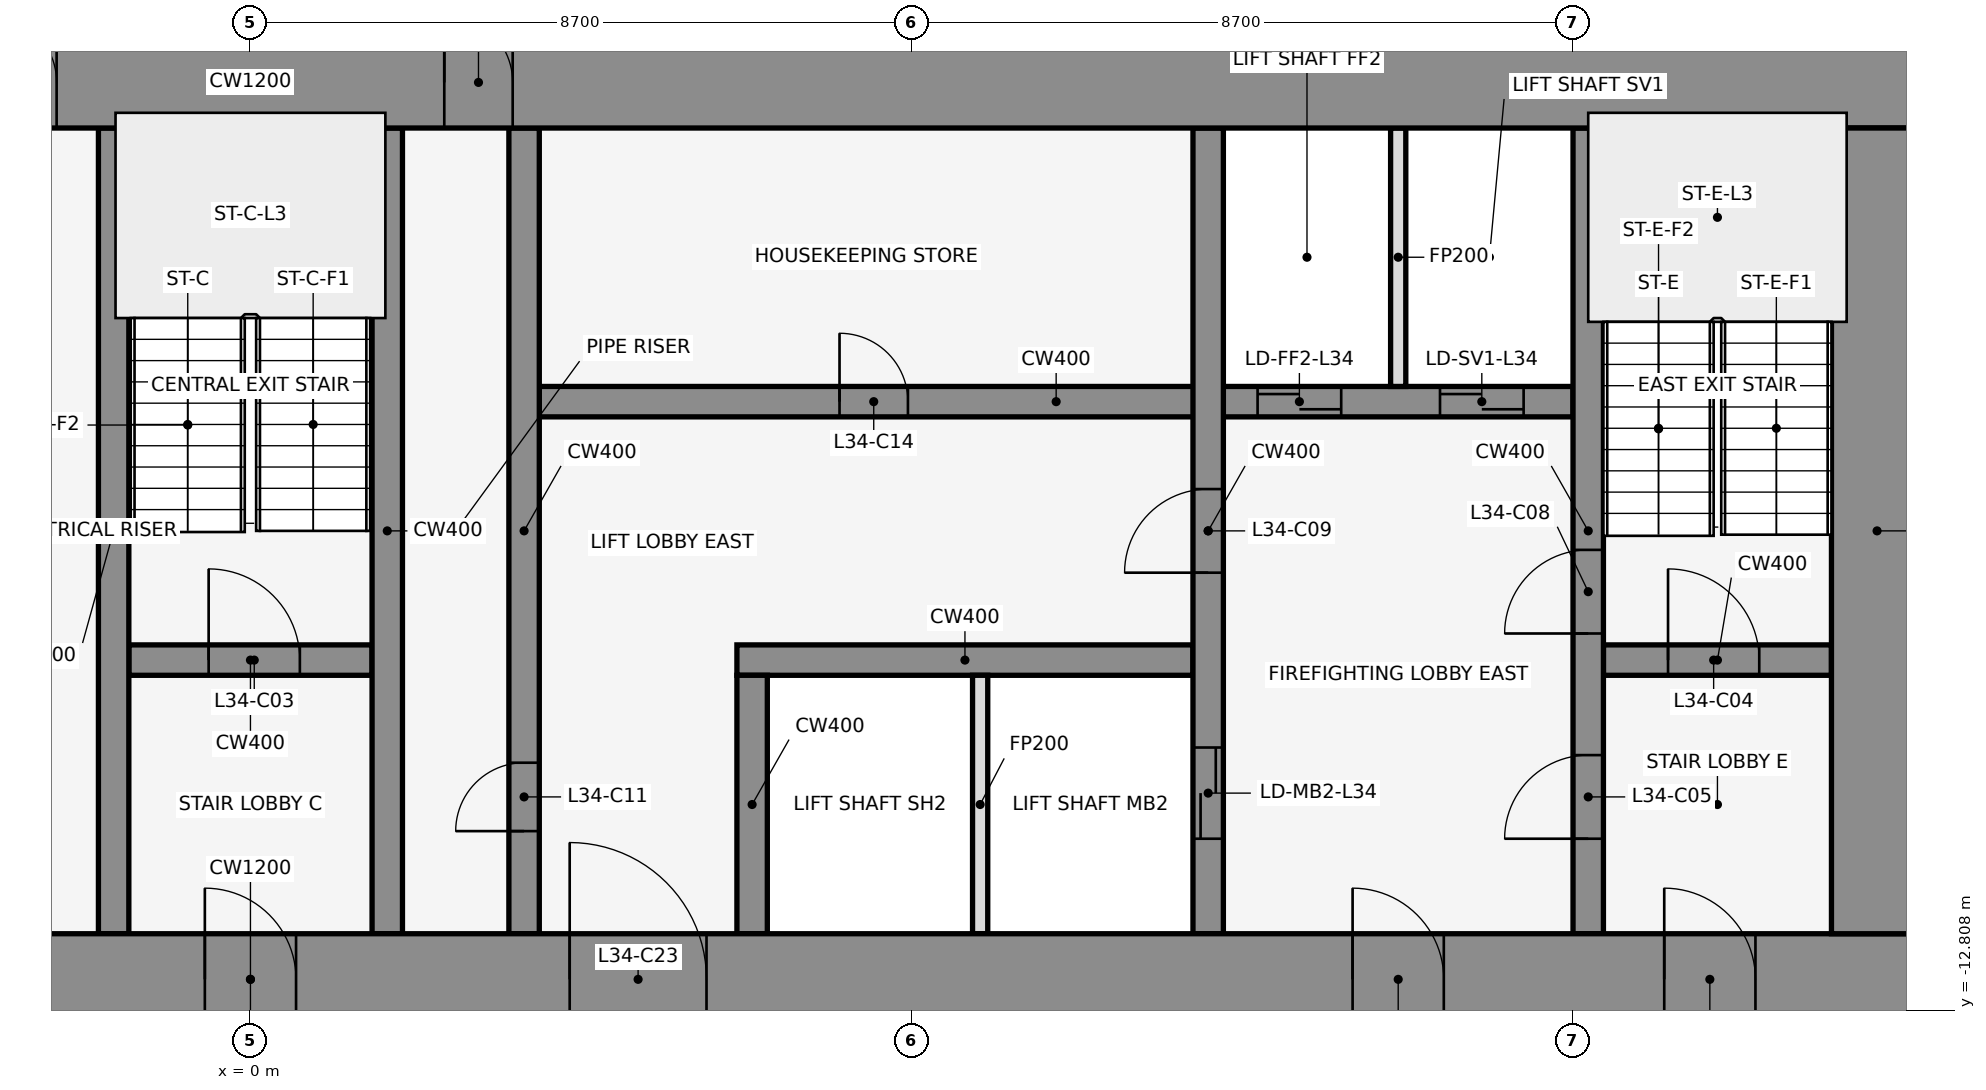
"""IFC4 building model, lengths in metres.
Left out: names, types, materials, properties, quantities, classifications, styles, units other than length and angle.
Written with IfcOpenShell. Run it as: python <this file> out.ifc"""

import sys

from ifc_helpers import new_model, si_unit, direction, frame, frame_2d, origin, place, context, subcontext, project, spatial, rectangle, extrude, element, fill, save


model = new_model("IFC4")
c1 = context("Model", 3, precision=1e-05, world=origin(), true_north=direction((0.0, 1.0)))
c2 = subcontext(c1, "Body", "Model", "MODEL_VIEW")
j1 = project(units=[si_unit("LENGTHUNIT", "METRE"), si_unit("PLANEANGLEUNIT", "RADIAN")], contexts=[c1])
p1 = place(None, origin())
s1 = spatial("IfcSite", under=j1, at=p1, CompositionType="ELEMENT")
p2 = place(p1, origin())
s2 = spatial("IfcBuilding", under=s1, at=p2, CompositionType="ELEMENT")
p3 = place(p2, frame((0.0, 0.0, 156.8)))
s3 = spatial("IfcBuildingStorey", under=s2, at=p3, CompositionType="ELEMENT", Elevation=156.8)
for number, where, z_axis, x_axis in (
    (1, (16.432, -0.105, 0.0), (0.0, 0.0, 1.0), (-0.84, 0.543, 0.0)),
    (2, (1.901, 1.08, 0.0), (0.0, 0.0, 1.0), (-0.84, -0.543, 0.0)),
    (3, (-0.068, -0.105, 0.0), (0.0, 0.0, 1.0), (-0.84, 0.543, 0.0)),
):
    element("IfcWall", number, at=place(p3, frame(where, z_axis=z_axis, x_axis=x_axis)), inside=s3, PredefinedType="STANDARD", context=c2, shape_type="SweptSolid", body=[
        extrude(rectangle(XDim=2.183, YDim=0.25, at=frame_2d((1.091, 0.0))), origin(), (0.0, 0.0, 1.0), 3.95),
    ])
p4 = place(p3, frame((-1.6, -8.2, 0.0), z_axis=(0.0, 0.0, 1.0), x_axis=(1.0, 0.0, 0.0)))
e4 = element("IfcWall", 4, at=p4, inside=s3, PredefinedType="SHEAR", context=c2, shape_type="SweptSolid", body=[
    extrude(rectangle(XDim=3.2, YDim=0.4, at=frame_2d((1.6, 0.0))), origin(), (0.0, 0.0, 1.0), 4.1),
])
p5 = place(p4, frame((1.05, 0.0, 0.0)))
e5 = element("IfcOpeningElement", 5, at=p5, cuts=e4, PredefinedType="OPENING", context=c2, shape_type="SweptSolid", body=[
    extrude(rectangle(XDim=1.2, YDim=2.1, at=frame_2d((0.6, 1.05))), frame((0.0, 0.212, 0.0), z_axis=(0.0, -1.0, 0.0), x_axis=(1.0, 0.0, 0.0)), (0.0, 0.0, 1.0), 0.424),
])
p6 = place(p3, frame((6.4, -8.2, 0.0), z_axis=(0.0, 0.0, 1.0), x_axis=(1.0, 0.0, 0.0)))
e6 = element("IfcWall", 6, at=p6, inside=s3, PredefinedType="SHEAR", context=c2, shape_type="SweptSolid", body=[
    extrude(rectangle(XDim=6.0, YDim=0.4, at=frame_2d((3.0, 0.0))), origin(), (0.0, 0.0, 1.0), 4.1),
])
p7 = place(p3, frame((17.8, -8.2, 0.0), z_axis=(0.0, 0.0, 1.0), x_axis=(1.0, 0.0, 0.0)))
e7 = element("IfcWall", 7, at=p7, inside=s3, PredefinedType="SHEAR", context=c2, shape_type="SweptSolid", body=[
    extrude(rectangle(XDim=3.0, YDim=0.4, at=frame_2d((1.5, 0.0))), origin(), (0.0, 0.0, 1.0), 4.1),
])
p8 = place(p7, frame((0.85, 0.0, 0.0)))
e8 = element("IfcOpeningElement", 8, at=p8, cuts=e7, PredefinedType="OPENING", context=c2, shape_type="SweptSolid", body=[
    extrude(rectangle(XDim=1.2, YDim=2.1, at=frame_2d((0.6, 1.05))), frame((0.0, 0.212, 0.0), z_axis=(0.0, -1.0, 0.0), x_axis=(1.0, 0.0, 0.0)), (0.0, 0.0, 1.0), 0.424),
])
p9 = place(p3, frame((3.8, -4.8, 0.0), z_axis=(0.0, 0.0, 1.0), x_axis=(1.0, 0.0, 0.0)))
e9 = element("IfcWall", 9, at=p9, inside=s3, PredefinedType="SHEAR", context=c2, shape_type="SweptSolid", body=[
    extrude(rectangle(XDim=13.6, YDim=0.4, at=frame_2d((6.8, 0.0))), origin(), (0.0, 0.0, 1.0), 4.1),
])
p10 = place(p9, frame((9.45, 0.0, 0.0)))
e10 = element("IfcOpeningElement", 10, at=p10, cuts=e9, PredefinedType="OPENING", context=c2, shape_type="SweptSolid", body=[
    extrude(rectangle(XDim=1.1, YDim=2.1, at=frame_2d((0.55, 1.05))), frame((0.0, 0.212, 0.0), z_axis=(0.0, -1.0, 0.0), x_axis=(1.0, 0.0, 0.0)), (0.0, 0.0, 1.0), 0.424),
])
p11 = place(p9, frame((11.85, 0.0, 0.0)))
e11 = element("IfcOpeningElement", 11, at=p11, cuts=e9, PredefinedType="OPENING", context=c2, shape_type="SweptSolid", body=[
    extrude(rectangle(XDim=1.1, YDim=2.1, at=frame_2d((0.55, 1.05))), frame((0.0, 0.212, 0.0), z_axis=(0.0, -1.0, 0.0), x_axis=(1.0, 0.0, 0.0)), (0.0, 0.0, 1.0), 0.424),
])
p12 = place(p9, frame((3.95, 0.0, 0.0)))
e12 = element("IfcOpeningElement", 12, at=p12, cuts=e9, PredefinedType="OPENING", context=c2, shape_type="SweptSolid", body=[
    extrude(rectangle(XDim=0.9, YDim=2.1, at=frame_2d((0.45, 1.05))), frame((0.0, 0.212, 0.0), z_axis=(0.0, -1.0, 0.0), x_axis=(1.0, 0.0, 0.0)), (0.0, 0.0, 1.0), 0.424),
])
for number, where, z_axis, x_axis in (
    (13, (-1.8, -11.8, 0.0), (0.0, 0.0, 1.0), (0.0, 1.0, 0.0)),
    (14, (1.8, -11.8, 0.0), (0.0, 0.0, 1.0), (0.0, 1.0, 0.0)),
):
    element("IfcWall", number, at=place(p3, frame(where, z_axis=z_axis, x_axis=x_axis)), inside=s3, PredefinedType="SHEAR", context=c2, shape_type="SweptSolid", body=[
        extrude(rectangle(XDim=10.6, YDim=0.4, at=frame_2d((5.3, 0.0))), origin(), (0.0, 0.0, 1.0), 4.1),
    ])
p13 = place(p3, frame((3.6, -11.8, 0.0), z_axis=(0.0, 0.0, 1.0), x_axis=(0.0, 1.0, 0.0)))
e15 = element("IfcWall", 15, at=p13, inside=s3, PredefinedType="SHEAR", context=c2, shape_type="SweptSolid", body=[
    extrude(rectangle(XDim=10.6, YDim=0.4, at=frame_2d((5.3, 0.0))), origin(), (0.0, 0.0, 1.0), 4.1),
])
p14 = place(p13, frame((1.35, 0.0, 0.0)))
e16 = element("IfcOpeningElement", 16, at=p14, cuts=e15, PredefinedType="OPENING", context=c2, shape_type="SweptSolid", body=[
    extrude(rectangle(XDim=0.9, YDim=2.1, at=frame_2d((0.45, 1.05))), frame((0.0, 0.212, 0.0), z_axis=(0.0, -1.0, 0.0), x_axis=(1.0, 0.0, 0.0)), (0.0, 0.0, 1.0), 0.424),
])
p15 = place(p3, frame((6.6, -11.8, 0.0), z_axis=(0.0, 0.0, 1.0), x_axis=(0.0, 1.0, 0.0)))
e17 = element("IfcWall", 17, at=p15, inside=s3, PredefinedType="SHEAR", context=c2, shape_type="SweptSolid", body=[
    extrude(rectangle(XDim=3.4, YDim=0.4, at=frame_2d((1.7, 0.0))), origin(), (0.0, 0.0, 1.0), 4.1),
])
p16 = place(p3, frame((9.6, -11.8, 0.0), z_axis=(0.0, 0.0, 1.0), x_axis=(0.0, 1.0, 0.0)))
e18 = element("IfcWall", 18, at=p16, inside=s3, PredefinedType="PARTITIONING", context=c2, shape_type="SweptSolid", body=[
    extrude(rectangle(XDim=3.4, YDim=0.2, at=frame_2d((1.7, 0.0))), origin(), (0.0, 0.0, 1.0), 2.84),
])
p17 = place(p3, frame((12.6, -11.8, 0.0), z_axis=(0.0, 0.0, 1.0), x_axis=(0.0, 1.0, 0.0)))
e19 = element("IfcWall", 19, at=p17, inside=s3, PredefinedType="SHEAR", context=c2, shape_type="SweptSolid", body=[
    extrude(rectangle(XDim=10.6, YDim=0.4, at=frame_2d((5.3, 0.0))), origin(), (0.0, 0.0, 1.0), 4.1),
])
p18 = place(p17, frame((1.25, 0.0, 0.0)))
e20 = element("IfcOpeningElement", 20, at=p18, cuts=e19, PredefinedType="OPENING", context=c2, shape_type="SweptSolid", body=[
    extrude(rectangle(XDim=1.2, YDim=2.1, at=frame_2d((0.6, 1.05))), frame((0.0, 0.212, 0.0), z_axis=(0.0, -1.0, 0.0), x_axis=(1.0, 0.0, 0.0)), (0.0, 0.0, 1.0), 0.424),
])
p19 = place(p17, frame((4.75, 0.0, 0.0)))
e21 = element("IfcOpeningElement", 21, at=p19, cuts=e19, PredefinedType="OPENING", context=c2, shape_type="SweptSolid", body=[
    extrude(rectangle(XDim=1.1, YDim=2.1, at=frame_2d((0.55, 1.05))), frame((0.0, 0.212, 0.0), z_axis=(0.0, -1.0, 0.0), x_axis=(1.0, 0.0, 0.0)), (0.0, 0.0, 1.0), 0.424),
])
p20 = place(p3, frame((15.1, -4.6, 0.0), z_axis=(0.0, 0.0, 1.0), x_axis=(0.0, 1.0, 0.0)))
e22 = element("IfcWall", 22, at=p20, inside=s3, PredefinedType="PARTITIONING", context=c2, shape_type="SweptSolid", body=[
    extrude(rectangle(XDim=3.4, YDim=0.2, at=frame_2d((1.7, 0.0))), origin(), (0.0, 0.0, 1.0), 2.84),
])
p21 = place(p3, frame((17.6, -11.8, 0.0), z_axis=(0.0, 0.0, 1.0), x_axis=(0.0, 1.0, 0.0)))
e23 = element("IfcWall", 23, at=p21, inside=s3, PredefinedType="SHEAR", context=c2, shape_type="SweptSolid", body=[
    extrude(rectangle(XDim=10.6, YDim=0.4, at=frame_2d((5.3, 0.0))), origin(), (0.0, 0.0, 1.0), 4.1),
])
p22 = place(p21, frame((1.25, 0.0, 0.0)))
e24 = element("IfcOpeningElement", 24, at=p22, cuts=e23, PredefinedType="OPENING", context=c2, shape_type="SweptSolid", body=[
    extrude(rectangle(XDim=1.1, YDim=2.1, at=frame_2d((0.55, 1.05))), frame((0.0, 0.212, 0.0), z_axis=(0.0, -1.0, 0.0), x_axis=(1.0, 0.0, 0.0)), (0.0, 0.0, 1.0), 0.424),
])
p23 = place(p21, frame((3.95, 0.0, 0.0)))
e25 = element("IfcOpeningElement", 25, at=p23, cuts=e23, PredefinedType="OPENING", context=c2, shape_type="SweptSolid", body=[
    extrude(rectangle(XDim=1.1, YDim=2.1, at=frame_2d((0.55, 1.05))), frame((0.0, 0.212, 0.0), z_axis=(0.0, -1.0, 0.0), x_axis=(1.0, 0.0, 0.0)), (0.0, 0.0, 1.0), 0.424),
])
p24 = place(p3, frame((-22.0, -0.6, 0.0), z_axis=(0.0, 0.0, 1.0), x_axis=(1.0, 0.0, 0.0)))
e26 = element("IfcWall", 26, at=p24, inside=s3, PredefinedType="SHEAR", context=c2, shape_type="SweptSolid", body=[
    extrude(rectangle(XDim=44.0, YDim=1.2, at=frame_2d((22.0, 0.0))), origin(), (0.0, 0.0, 1.0), 4.1),
])
p25 = place(p24, frame((18.55, 0.0, 0.0)))
e27 = element("IfcOpeningElement", 27, at=p25, cuts=e26, PredefinedType="OPENING", context=c2, shape_type="SweptSolid", body=[
    extrude(rectangle(XDim=0.9, YDim=2.1, at=frame_2d((0.45, 1.05))), frame((0.0, 0.612, 0.0), z_axis=(0.0, -1.0, 0.0), x_axis=(1.0, 0.0, 0.0)), (0.0, 0.0, 1.0), 1.224),
])
p26 = place(p24, frame((24.55, 0.0, 0.0)))
e28 = element("IfcOpeningElement", 28, at=p26, cuts=e26, PredefinedType="OPENING", context=c2, shape_type="SweptSolid", body=[
    extrude(rectangle(XDim=0.9, YDim=2.1, at=frame_2d((0.45, 1.05))), frame((0.0, 0.612, 0.0), z_axis=(0.0, -1.0, 0.0), x_axis=(1.0, 0.0, 0.0)), (0.0, 0.0, 1.0), 1.224),
])
p27 = place(p3, frame((-22.0, -12.4, 0.0), z_axis=(0.0, 0.0, 1.0), x_axis=(1.0, 0.0, 0.0)))
e29 = element("IfcWall", 29, at=p27, inside=s3, PredefinedType="SHEAR", context=c2, shape_type="SweptSolid", body=[
    extrude(rectangle(XDim=44.0, YDim=1.2, at=frame_2d((22.0, 0.0))), origin(), (0.0, 0.0, 1.0), 4.1),
])
p28 = place(p27, frame((2.2, 0.0, 0.0)))
e30 = element("IfcOpeningElement", 30, at=p28, cuts=e29, PredefinedType="OPENING", context=c2, shape_type="SweptSolid", body=[
    extrude(rectangle(XDim=1.2, YDim=2.1, at=frame_2d((0.6, 1.05))), frame((0.0, 0.612, 0.0), z_axis=(0.0, -1.0, 0.0), x_axis=(1.0, 0.0, 0.0)), (0.0, 0.0, 1.0), 1.224),
])
p29 = place(p27, frame((21.4, 0.0, 0.0)))
e31 = element("IfcOpeningElement", 31, at=p29, cuts=e29, PredefinedType="OPENING", context=c2, shape_type="SweptSolid", body=[
    extrude(rectangle(XDim=1.2, YDim=2.1, at=frame_2d((0.6, 1.05))), frame((0.0, 0.612, 0.0), z_axis=(0.0, -1.0, 0.0), x_axis=(1.0, 0.0, 0.0)), (0.0, 0.0, 1.0), 1.224),
])
p30 = place(p27, frame((40.6, 0.0, 0.0)))
e32 = element("IfcOpeningElement", 32, at=p30, cuts=e29, PredefinedType="OPENING", context=c2, shape_type="SweptSolid", body=[
    extrude(rectangle(XDim=1.2, YDim=2.1, at=frame_2d((0.6, 1.05))), frame((0.0, 0.612, 0.0), z_axis=(0.0, -1.0, 0.0), x_axis=(1.0, 0.0, 0.0)), (0.0, 0.0, 1.0), 1.224),
])
p31 = place(p27, frame((16.0, 0.0, 0.0)))
e33 = element("IfcOpeningElement", 33, at=p31, cuts=e29, PredefinedType="OPENING", context=c2, shape_type="SweptSolid", body=[
    extrude(rectangle(XDim=1.8, YDim=2.1, at=frame_2d((0.9, 1.05))), frame((0.0, 0.612, 0.0), z_axis=(0.0, -1.0, 0.0), x_axis=(1.0, 0.0, 0.0)), (0.0, 0.0, 1.0), 1.224),
])
p32 = place(p27, frame((6.3, 0.0, 0.0)))
e34 = element("IfcOpeningElement", 34, at=p32, cuts=e29, PredefinedType="OPENING", context=c2, shape_type="SweptSolid", body=[
    extrude(rectangle(XDim=1.2, YDim=2.1, at=frame_2d((0.6, 1.05))), frame((0.0, 0.612, 0.0), z_axis=(0.0, -1.0, 0.0), x_axis=(1.0, 0.0, 0.0)), (0.0, 0.0, 1.0), 1.224),
])
p33 = place(p27, frame((26.2, 0.0, 0.0)))
e35 = element("IfcOpeningElement", 35, at=p33, cuts=e29, PredefinedType="OPENING", context=c2, shape_type="SweptSolid", body=[
    extrude(rectangle(XDim=1.8, YDim=2.1, at=frame_2d((0.9, 1.05))), frame((0.0, 0.612, 0.0), z_axis=(0.0, -1.0, 0.0), x_axis=(1.0, 0.0, 0.0)), (0.0, 0.0, 1.0), 1.224),
])
p34 = place(p27, frame((36.5, 0.0, 0.0)))
e36 = element("IfcOpeningElement", 36, at=p34, cuts=e29, PredefinedType="OPENING", context=c2, shape_type="SweptSolid", body=[
    extrude(rectangle(XDim=1.2, YDim=2.1, at=frame_2d((0.6, 1.05))), frame((0.0, 0.612, 0.0), z_axis=(0.0, -1.0, 0.0), x_axis=(1.0, 0.0, 0.0)), (0.0, 0.0, 1.0), 1.224),
])
p35 = place(p3, frame((21.4, -11.8, 0.0), z_axis=(0.0, 0.0, 1.0), x_axis=(0.0, 1.0, 0.0)))
e37 = element("IfcWall", 37, at=p35, inside=s3, PredefinedType="SHEAR", context=c2, shape_type="SweptSolid", body=[
    extrude(rectangle(XDim=10.6, YDim=1.2, at=frame_2d((5.3, 0.0))), origin(), (0.0, 0.0, 1.0), 4.1),
])
p36 = place(p5, origin())
e38 = element("IfcDoor", 38, at=p36, inside=s3, OperationType="SINGLE_SWING_LEFT", PredefinedType="DOOR", context=c2, shape_type="SweptSolid", body=[
    extrude(rectangle(XDim=1.2, YDim=2.1, at=frame_2d((0.6, 1.05))), frame((0.0, 0.025, 0.0), z_axis=(0.0, -1.0, 0.0), x_axis=(1.0, 0.0, 0.0)), (0.0, 0.0, 1.0), 0.05),
])
fill(e5, e38)
p37 = place(p8, origin())
e39 = element("IfcDoor", 39, at=p37, inside=s3, OperationType="SINGLE_SWING_RIGHT", PredefinedType="DOOR", context=c2, shape_type="SweptSolid", body=[
    extrude(rectangle(XDim=1.2, YDim=2.1, at=frame_2d((0.6, 1.05))), frame((0.0, 0.025, 0.0), z_axis=(0.0, -1.0, 0.0), x_axis=(1.0, 0.0, 0.0)), (0.0, 0.0, 1.0), 0.05),
])
fill(e8, e39)
p38 = place(p22, origin())
e40 = element("IfcDoor", 40, at=p38, inside=s3, OperationType="SINGLE_SWING_LEFT", PredefinedType="DOOR", context=c2, shape_type="SweptSolid", body=[
    extrude(rectangle(XDim=1.1, YDim=2.1, at=frame_2d((0.55, 1.05))), frame((0.0, 0.025, 0.0), z_axis=(0.0, -1.0, 0.0), x_axis=(1.0, 0.0, 0.0)), (0.0, 0.0, 1.0), 0.05),
])
fill(e24, e40)
p39 = place(p18, origin())
e41 = element("IfcDoor", 41, at=p39, inside=s3, OperationType="DOUBLE_DOOR_SLIDING", PredefinedType="DOOR", context=c2, shape_type="SweptSolid", body=[
    extrude(rectangle(XDim=1.2, YDim=2.1, at=frame_2d((0.6, 1.05))), frame((0.0, 0.025, 0.0), z_axis=(0.0, -1.0, 0.0), x_axis=(1.0, 0.0, 0.0)), (0.0, 0.0, 1.0), 0.05),
])
fill(e20, e41)
p40 = place(p10, origin())
e42 = element("IfcDoor", 42, at=p40, inside=s3, OperationType="DOUBLE_DOOR_SLIDING", PredefinedType="DOOR", context=c2, shape_type="SweptSolid", body=[
    extrude(rectangle(XDim=1.1, YDim=2.1, at=frame_2d((0.55, 1.05))), frame((0.0, 0.025, 0.0), z_axis=(0.0, -1.0, 0.0), x_axis=(1.0, 0.0, 0.0)), (0.0, 0.0, 1.0), 0.05),
])
fill(e10, e42)
p41 = place(p11, origin())
e43 = element("IfcDoor", 43, at=p41, inside=s3, OperationType="DOUBLE_DOOR_SLIDING", PredefinedType="DOOR", context=c2, shape_type="SweptSolid", body=[
    extrude(rectangle(XDim=1.1, YDim=2.1, at=frame_2d((0.55, 1.05))), frame((0.0, 0.025, 0.0), z_axis=(0.0, -1.0, 0.0), x_axis=(1.0, 0.0, 0.0)), (0.0, 0.0, 1.0), 0.05),
])
fill(e11, e43)
p42 = place(p23, origin())
e44 = element("IfcDoor", 44, at=p42, inside=s3, OperationType="SINGLE_SWING_RIGHT", PredefinedType="DOOR", context=c2, shape_type="SweptSolid", body=[
    extrude(rectangle(XDim=1.1, YDim=2.1, at=frame_2d((0.55, 1.05))), frame((0.0, 0.025, 0.0), z_axis=(0.0, -1.0, 0.0), x_axis=(1.0, 0.0, 0.0)), (0.0, 0.0, 1.0), 0.05),
])
fill(e25, e44)
p43 = place(p19, frame((1.1, 0.0, 0.0), z_axis=(0.0, 0.0, 1.0), x_axis=(-1.0, 0.0, 0.0)))
e45 = element("IfcDoor", 45, at=p43, inside=s3, OperationType="SINGLE_SWING_RIGHT", PredefinedType="DOOR", context=c2, shape_type="SweptSolid", body=[
    extrude(rectangle(XDim=1.1, YDim=2.1, at=frame_2d((0.55, 1.05))), frame((0.0, 0.025, 0.0), z_axis=(0.0, -1.0, 0.0), x_axis=(1.0, 0.0, 0.0)), (0.0, 0.0, 1.0), 0.05),
])
fill(e21, e45)
p44 = place(p14, origin())
e46 = element("IfcDoor", 46, at=p44, inside=s3, OperationType="SINGLE_SWING_LEFT", PredefinedType="DOOR", context=c2, shape_type="SweptSolid", body=[
    extrude(rectangle(XDim=0.9, YDim=2.1, at=frame_2d((0.45, 1.05))), frame((0.0, 0.025, 0.0), z_axis=(0.0, -1.0, 0.0), x_axis=(1.0, 0.0, 0.0)), (0.0, 0.0, 1.0), 0.05),
])
fill(e16, e46)
p45 = place(p12, origin())
e47 = element("IfcDoor", 47, at=p45, inside=s3, OperationType="SINGLE_SWING_RIGHT", PredefinedType="DOOR", context=c2, shape_type="SweptSolid", body=[
    extrude(rectangle(XDim=0.9, YDim=2.1, at=frame_2d((0.45, 1.05))), frame((0.0, 0.025, 0.0), z_axis=(0.0, -1.0, 0.0), x_axis=(1.0, 0.0, 0.0)), (0.0, 0.0, 1.0), 0.05),
])
fill(e12, e47)
p46 = place(p25, origin())
e48 = element("IfcDoor", 48, at=p46, inside=s3, OperationType="SINGLE_SWING_LEFT", PredefinedType="DOOR", context=c2, shape_type="SweptSolid", body=[
    extrude(rectangle(XDim=0.9, YDim=2.1, at=frame_2d((0.45, 1.05))), frame((0.0, 0.025, 0.0), z_axis=(0.0, -1.0, 0.0), x_axis=(1.0, 0.0, 0.0)), (0.0, 0.0, 1.0), 0.05),
])
fill(e27, e48)
p47 = place(p26, origin())
e49 = element("IfcDoor", 49, at=p47, inside=s3, OperationType="SINGLE_SWING_LEFT", PredefinedType="DOOR", context=c2, shape_type="SweptSolid", body=[
    extrude(rectangle(XDim=0.9, YDim=2.1, at=frame_2d((0.45, 1.05))), frame((0.0, 0.025, 0.0), z_axis=(0.0, -1.0, 0.0), x_axis=(1.0, 0.0, 0.0)), (0.0, 0.0, 1.0), 0.05),
])
fill(e28, e49)
p48 = place(p29, frame((1.2, 0.0, 0.0), z_axis=(0.0, 0.0, 1.0), x_axis=(-1.0, 0.0, 0.0)))
e50 = element("IfcDoor", 50, at=p48, inside=s3, OperationType="SINGLE_SWING_RIGHT", PredefinedType="DOOR", context=c2, shape_type="SweptSolid", body=[
    extrude(rectangle(XDim=1.2, YDim=2.1, at=frame_2d((0.6, 1.05))), frame((0.0, 0.025, 0.0), z_axis=(0.0, -1.0, 0.0), x_axis=(1.0, 0.0, 0.0)), (0.0, 0.0, 1.0), 0.05),
])
fill(e31, e50)
p49 = place(p30, frame((1.2, 0.0, 0.0), z_axis=(0.0, 0.0, 1.0), x_axis=(-1.0, 0.0, 0.0)))
e51 = element("IfcDoor", 51, at=p49, inside=s3, OperationType="SINGLE_SWING_RIGHT", PredefinedType="DOOR", context=c2, shape_type="SweptSolid", body=[
    extrude(rectangle(XDim=1.2, YDim=2.1, at=frame_2d((0.6, 1.05))), frame((0.0, 0.025, 0.0), z_axis=(0.0, -1.0, 0.0), x_axis=(1.0, 0.0, 0.0)), (0.0, 0.0, 1.0), 0.05),
])
fill(e32, e51)
p50 = place(p33, origin())
e52 = element("IfcDoor", 52, at=p50, inside=s3, OperationType="SINGLE_SWING_LEFT", PredefinedType="DOOR", context=c2, shape_type="SweptSolid", body=[
    extrude(rectangle(XDim=1.8, YDim=2.1, at=frame_2d((0.9, 1.05))), frame((0.0, 0.025, 0.0), z_axis=(0.0, -1.0, 0.0), x_axis=(1.0, 0.0, 0.0)), (0.0, 0.0, 1.0), 0.05),
])
fill(e35, e52)
p51 = place(p34, frame((1.2, 0.0, 0.0), z_axis=(0.0, 0.0, 1.0), x_axis=(-1.0, 0.0, 0.0)))
e53 = element("IfcDoor", 53, at=p51, inside=s3, OperationType="SINGLE_SWING_RIGHT", PredefinedType="DOOR", context=c2, shape_type="SweptSolid", body=[
    extrude(rectangle(XDim=1.2, YDim=2.1, at=frame_2d((0.6, 1.05))), frame((0.0, 0.025, 0.0), z_axis=(0.0, -1.0, 0.0), x_axis=(1.0, 0.0, 0.0)), (0.0, 0.0, 1.0), 0.05),
])
fill(e36, e53)
save(model, sys.argv[1])
